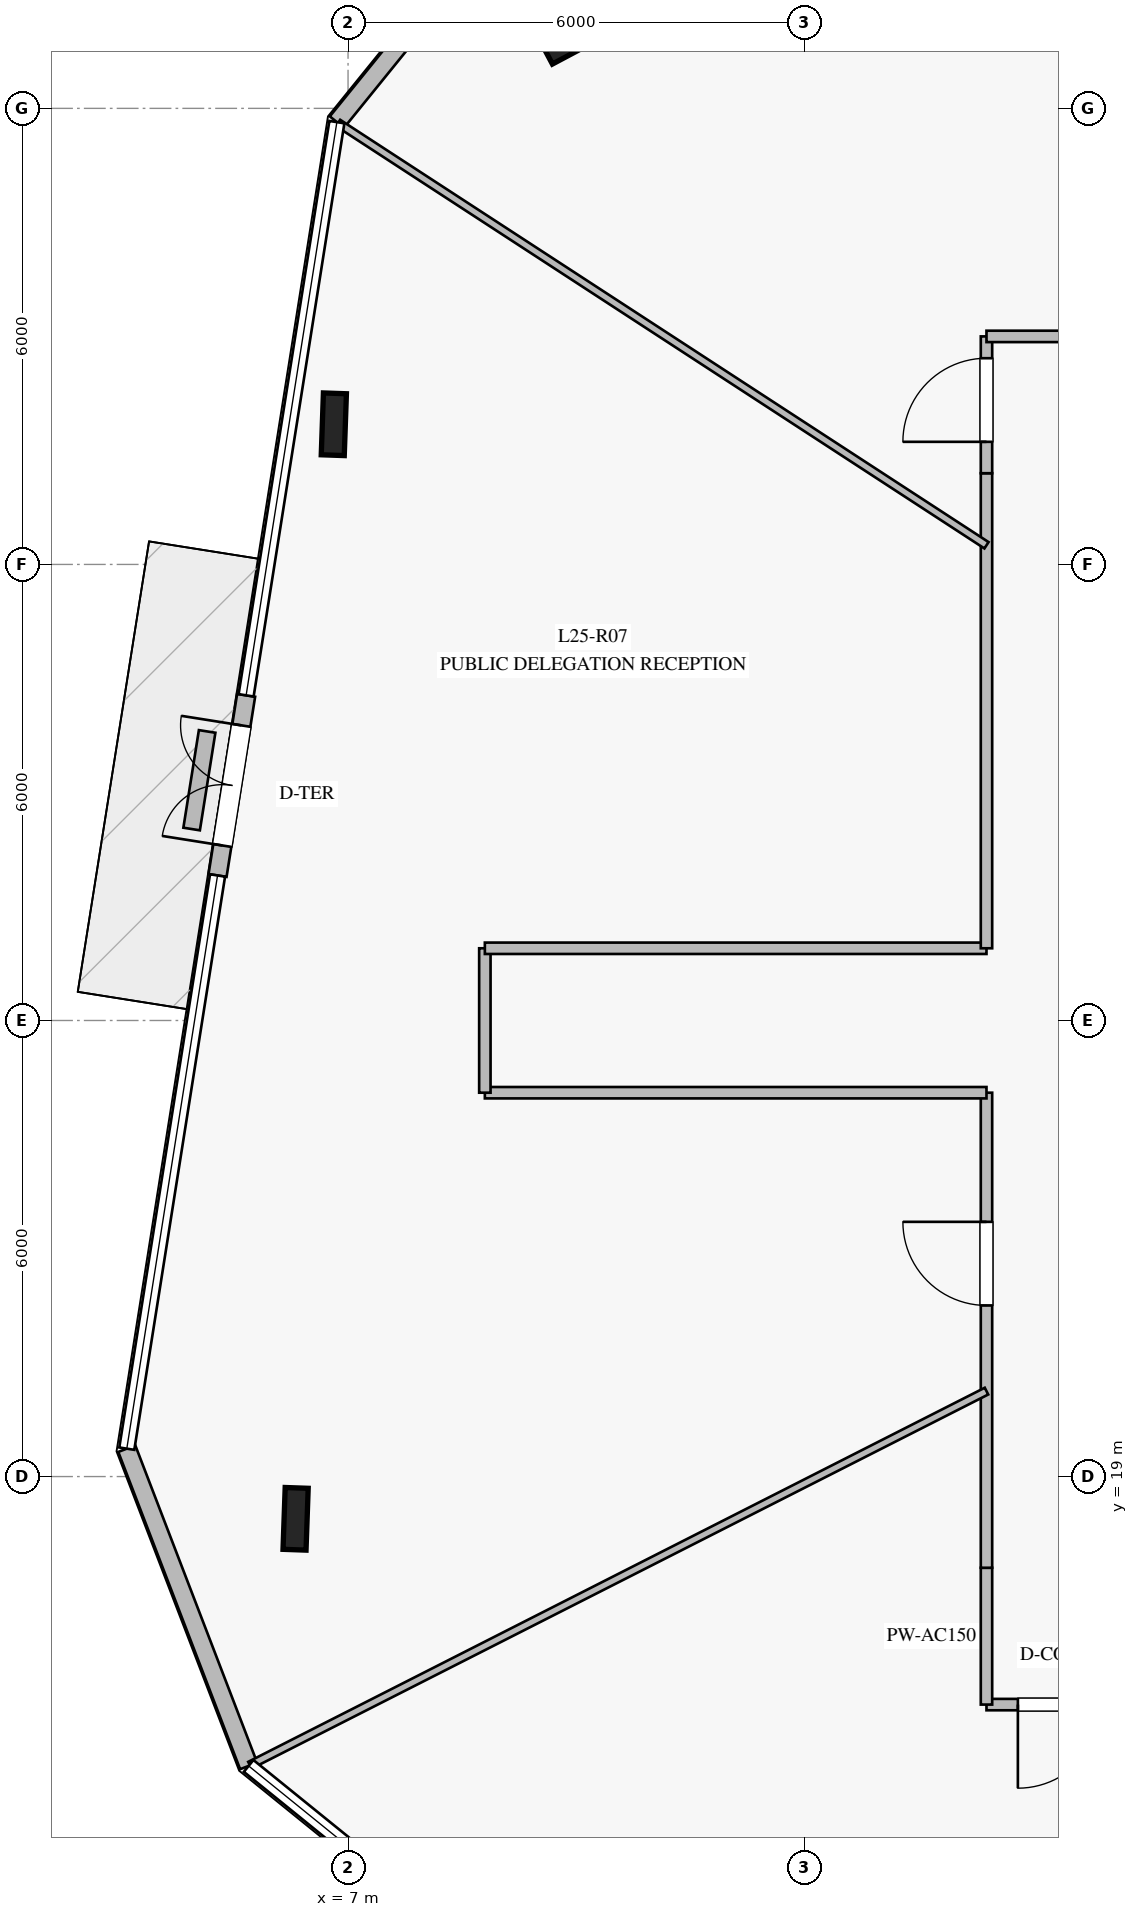
"""IFC4 building model, lengths in metres.
Left out: names, types, materials, properties, quantities, classifications, styles, units other than length and angle.
Written with IfcOpenShell. Run it as: python <this file> out.ifc"""

import sys

from ifc_helpers import new_model, si_unit, direction, frame, frame_2d, origin, origin_2d, place, context, subcontext, project, spatial, rectangle, i_section, extrude, element, fill, save


model = new_model("IFC4")
c1 = context("Model", 3, precision=1e-05, world=origin(), true_north=direction((0.0, 1.0)))
c2 = subcontext(c1, "Body", "Model", "MODEL_VIEW")
j1 = project(units=[si_unit("LENGTHUNIT", "METRE"), si_unit("PLANEANGLEUNIT", "RADIAN")], contexts=[c1])
p1 = place(None, origin())
s1 = spatial("IfcSite", under=j1, at=p1, CompositionType="ELEMENT")
p2 = place(p1, origin())
s2 = spatial("IfcBuilding", under=s1, at=p2, CompositionType="ELEMENT")
p3 = place(p2, frame((0.0, 0.0, 106.4)))
s3 = spatial("IfcBuildingStorey", under=s2, at=p3, CompositionType="ELEMENT", Elevation=106.4)
for number, where, z_axis, x_axis in (
    (1, (9.977, 37.908, 0.0), (0.0, 0.0, 1.0), (0.883, 0.469, 0.0)),
    (2, (6.813, 32.844, 0.0), (0.0, 0.0, 1.0), (0.035, 0.999, 0.0)),
    (3, (6.31, 18.444, 0.0), (0.0, 0.0, 1.0), (0.035, 0.999, 0.0)),
):
    element("IfcColumn", number, at=place(p3, frame(where, z_axis=z_axis, x_axis=x_axis)), inside=s3, PredefinedType="COLUMN", context=c2, shape_type="SweptSolid", body=[
        extrude(i_section(OverallWidth=0.303, OverallDepth=0.814, WebThickness=0.021, FlangeThickness=0.04, at=origin_2d()), origin(), (0.0, 0.0, 1.0), 4.0),
    ])
p4 = place(p3, frame((9.667, 40.293, 0.0), z_axis=(0.0, 0.0, 1.0), x_axis=(-0.629438558802, -0.777050256221, 0.0)))
e4 = element("IfcWall", 4, at=p4, inside=s3, PredefinedType="STANDARD", context=c2, shape_type="SweptSolid", body=[
    extrude(rectangle(XDim=4.471, YDim=0.24, at=frame_2d((2.235, 0.0))), origin(), (0.0, 0.0, 1.0), 3.76),
])
p5 = place(p3, frame((5.659, 29.278, 0.0), z_axis=(0.0, 0.0, 1.0), x_axis=(-0.156673033509, -0.987650525526, 0.0)))
e5 = element("IfcWall", 5, at=p5, inside=s3, PredefinedType="STANDARD", context=c2, shape_type="SweptSolid", body=[
    extrude(rectangle(XDim=2.4, YDim=0.24, at=frame_2d((1.2, 0.0))), origin(), (0.0, 0.0, 1.0), 3.76),
])
p6 = place(p5, frame((0.4, 0.0, 0.0)))
e6 = element("IfcOpeningElement", 6, at=p6, cuts=e5, PredefinedType="OPENING", context=c2, shape_type="SweptSolid", body=[
    extrude(rectangle(XDim=1.6, YDim=2.25, at=frame_2d((0.8, 1.125))), frame((0.0, 0.13, 0.0), z_axis=(0.0, -1.0, 0.0), x_axis=(1.0, 0.0, 0.0)), (0.0, 0.0, 1.0), 0.26),
])
p7 = place(p3, frame((4.089, 19.367, 0.0), z_axis=(0.0, 0.0, 1.0), x_axis=(0.35848504637, -0.933535468811, 0.0)))
e7 = element("IfcWall", 7, at=p7, inside=s3, PredefinedType="STANDARD", context=c2, shape_type="SweptSolid", body=[
    extrude(rectangle(XDim=4.471, YDim=0.24, at=frame_2d((2.235, 0.0))), origin(), (0.0, 0.0, 1.0), 3.76),
])
p8 = place(p3, frame((5.146, 28.803, 0.0), z_axis=(0.0, 0.0, 1.0), x_axis=(-0.156994330722, -0.987599503909, 0.0)))
e8 = element("IfcWall", 8, at=p8, inside=s3, PredefinedType="USERDEFINED", context=c2, shape_type="SweptSolid", body=[
    extrude(rectangle(XDim=1.3, YDim=0.22, at=frame_2d((0.65, 0.0))), origin(), (0.0, 0.0, 1.0), 0.4),
])
p9 = place(p3, frame((17.2, 16.0, 0.0), z_axis=(0.0, 0.0, 1.0), x_axis=(-1.0, 0.0, 0.0)))
e9 = element("IfcWall", 9, at=p9, inside=s3, PredefinedType="PARTITIONING", context=c2, shape_type="SweptSolid", body=[
    extrude(rectangle(XDim=1.8, YDim=0.15, at=frame_2d((0.9, 0.0))), origin(), (0.0, 0.0, 1.0), 3.36),
])
p10 = place(p9, frame((0.287, 0.0, 0.0)))
e10 = element("IfcOpeningElement", 10, at=p10, cuts=e9, PredefinedType="OPENING", context=c2, shape_type="SweptSolid", body=[
    extrude(rectangle(XDim=1.1, YDim=2.2, at=frame_2d((0.55, 1.1))), frame((0.0, 0.085, 0.0), z_axis=(0.0, -1.0, 0.0), x_axis=(1.0, 0.0, 0.0)), (0.0, 0.0, 1.0), 0.17),
])
p11 = place(p3, frame((15.4, 16.0, 0.0), z_axis=(0.0, 0.0, 1.0), x_axis=(0.0, 1.0, 0.0)))
e11 = element("IfcWall", 11, at=p11, inside=s3, PredefinedType="PARTITIONING", context=c2, shape_type="SweptSolid", body=[
    extrude(rectangle(XDim=1.8, YDim=0.15, at=frame_2d((0.9, 0.0))), origin(), (0.0, 0.0, 1.0), 3.21),
])
p12 = place(p3, frame((15.4, 17.8, 0.0), z_axis=(0.0, 0.0, 1.0), x_axis=(0.0, 1.0, 0.0)))
e12 = element("IfcWall", 12, at=p12, inside=s3, PredefinedType="PARTITIONING", context=c2, shape_type="SweptSolid", body=[
    extrude(rectangle(XDim=6.25, YDim=0.15, at=frame_2d((3.125, 0.0))), origin(), (0.0, 0.0, 1.0), 3.21),
])
p13 = place(p12, frame((3.451, 0.0, 0.0)))
e13 = element("IfcOpeningElement", 13, at=p13, cuts=e12, PredefinedType="OPENING", context=c2, shape_type="SweptSolid", body=[
    extrude(rectangle(XDim=1.1, YDim=2.2, at=frame_2d((0.55, 1.1))), frame((0.0, 0.085, 0.0), z_axis=(0.0, -1.0, 0.0), x_axis=(1.0, 0.0, 0.0)), (0.0, 0.0, 1.0), 0.17),
])
p14 = place(p3, frame((15.4, 24.05, 0.0), z_axis=(0.0, 0.0, 1.0), x_axis=(-1.0, 0.0, 0.0)))
e14 = element("IfcWall", 14, at=p14, inside=s3, PredefinedType="PARTITIONING", context=c2, shape_type="SweptSolid", body=[
    extrude(rectangle(XDim=6.6, YDim=0.15, at=frame_2d((3.3, 0.0))), origin(), (0.0, 0.0, 1.0), 3.02),
])
p15 = place(p3, frame((8.8, 24.05, 0.0), z_axis=(0.0, 0.0, 1.0), x_axis=(0.0, 1.0, 0.0)))
e15 = element("IfcWall", 15, at=p15, inside=s3, PredefinedType="PARTITIONING", context=c2, shape_type="SweptSolid", body=[
    extrude(rectangle(XDim=1.9, YDim=0.15, at=frame_2d((0.95, 0.0))), origin(), (0.0, 0.0, 1.0), 3.27),
])
p16 = place(p3, frame((8.8, 25.95, 0.0), z_axis=(0.0, 0.0, 1.0), x_axis=(1.0, 0.0, 0.0)))
e16 = element("IfcWall", 16, at=p16, inside=s3, PredefinedType="PARTITIONING", context=c2, shape_type="SweptSolid", body=[
    extrude(rectangle(XDim=6.6, YDim=0.15, at=frame_2d((3.3, 0.0))), origin(), (0.0, 0.0, 1.0), 3.02),
])
p17 = place(p3, frame((15.4, 25.95, 0.0), z_axis=(0.0, 0.0, 1.0), x_axis=(0.0, 1.0, 0.0)))
e17 = element("IfcWall", 17, at=p17, inside=s3, PredefinedType="PARTITIONING", context=c2, shape_type="SweptSolid", body=[
    extrude(rectangle(XDim=6.25, YDim=0.15, at=frame_2d((3.125, 0.0))), origin(), (0.0, 0.0, 1.0), 3.21),
])
p18 = place(p3, frame((15.4, 32.2, 0.0), z_axis=(0.0, 0.0, 1.0), x_axis=(0.0, 1.0, 0.0)))
e18 = element("IfcWall", 18, at=p18, inside=s3, PredefinedType="PARTITIONING", context=c2, shape_type="SweptSolid", body=[
    extrude(rectangle(XDim=1.8, YDim=0.15, at=frame_2d((0.9, 0.0))), origin(), (0.0, 0.0, 1.0), 3.21),
])
p19 = place(p18, frame((0.413, 0.0, 0.0)))
e19 = element("IfcOpeningElement", 19, at=p19, cuts=e18, PredefinedType="OPENING", context=c2, shape_type="SweptSolid", body=[
    extrude(rectangle(XDim=1.1, YDim=2.2, at=frame_2d((0.55, 1.1))), frame((0.0, 0.085, 0.0), z_axis=(0.0, -1.0, 0.0), x_axis=(1.0, 0.0, 0.0)), (0.0, 0.0, 1.0), 0.17),
])
p20 = place(p3, frame((15.4, 34.0, 0.0), z_axis=(0.0, 0.0, 1.0), x_axis=(1.0, 0.0, 0.0)))
e20 = element("IfcWall", 20, at=p20, inside=s3, PredefinedType="PARTITIONING", context=c2, shape_type="SweptSolid", body=[
    extrude(rectangle(XDim=1.8, YDim=0.15, at=frame_2d((0.9, 0.0))), origin(), (0.0, 0.0, 1.0), 3.76),
])
p21 = place(p3, frame((15.4, 31.252, 0.0), z_axis=(0.0, 0.0, 1.0), x_axis=(-0.837949628646, 0.545747578878, 0.0)))
e21 = element("IfcWall", 21, at=p21, inside=s3, PredefinedType="MOVABLE", context=c2, shape_type="SweptSolid", body=[
    extrude(rectangle(XDim=10.181, YDim=0.1, at=frame_2d((5.09, 0.0))), origin(), (0.0, 0.0, 1.0), 3.16),
])
p22 = place(p3, frame((15.4, 20.124, 0.0), z_axis=(0.0, 0.0, 1.0), x_axis=(-0.891588225001, -0.452847034923, 0.0)))
e22 = element("IfcWall", 22, at=p22, inside=s3, PredefinedType="MOVABLE", context=c2, shape_type="SweptSolid", body=[
    extrude(rectangle(XDim=10.869, YDim=0.1, at=frame_2d((5.435, 0.0))), origin(), (0.0, 0.0, 1.0), 3.02),
])
p23 = place(p6, frame((1.6, 0.0, 0.0), z_axis=(0.0, 0.0, 1.0), x_axis=(-1.0, 0.0, 0.0)))
e23 = element("IfcDoor", 23, at=p23, inside=s3, OperationType="DOUBLE_DOOR_SINGLE_SWING", PredefinedType="DOOR", context=c2, shape_type="SweptSolid", body=[
    extrude(rectangle(XDim=1.6, YDim=2.25, at=frame_2d((0.8, 1.125))), frame((0.0, 0.025, 0.0), z_axis=(0.0, -1.0, 0.0), x_axis=(1.0, 0.0, 0.0)), (0.0, 0.0, 1.0), 0.05),
])
fill(e6, e23)
p24 = place(p10, origin())
e24 = element("IfcDoor", 24, at=p24, inside=s3, OperationType="SINGLE_SWING_RIGHT", PredefinedType="DOOR", context=c2, shape_type="SweptSolid", body=[
    extrude(rectangle(XDim=1.1, YDim=2.2, at=frame_2d((0.55, 1.1))), frame((0.0, 0.025, 0.0), z_axis=(0.0, -1.0, 0.0), x_axis=(1.0, 0.0, 0.0)), (0.0, 0.0, 1.0), 0.05),
])
fill(e10, e24)
p25 = place(p19, origin())
e25 = element("IfcDoor", 25, at=p25, inside=s3, OperationType="SINGLE_SWING_LEFT", PredefinedType="DOOR", context=c2, shape_type="SweptSolid", body=[
    extrude(rectangle(XDim=1.1, YDim=2.2, at=frame_2d((0.55, 1.1))), frame((0.0, 0.025, 0.0), z_axis=(0.0, -1.0, 0.0), x_axis=(1.0, 0.0, 0.0)), (0.0, 0.0, 1.0), 0.05),
])
fill(e19, e25)
p26 = place(p13, origin())
e26 = element("IfcDoor", 26, at=p26, inside=s3, OperationType="SINGLE_SWING_RIGHT", PredefinedType="DOOR", context=c2, shape_type="SweptSolid", body=[
    extrude(rectangle(XDim=1.1, YDim=2.2, at=frame_2d((0.55, 1.1))), frame((0.0, 0.025, 0.0), z_axis=(0.0, -1.0, 0.0), x_axis=(1.0, 0.0, 0.0)), (0.0, 0.0, 1.0), 0.05),
])
fill(e13, e26)
save(model, sys.argv[1])
